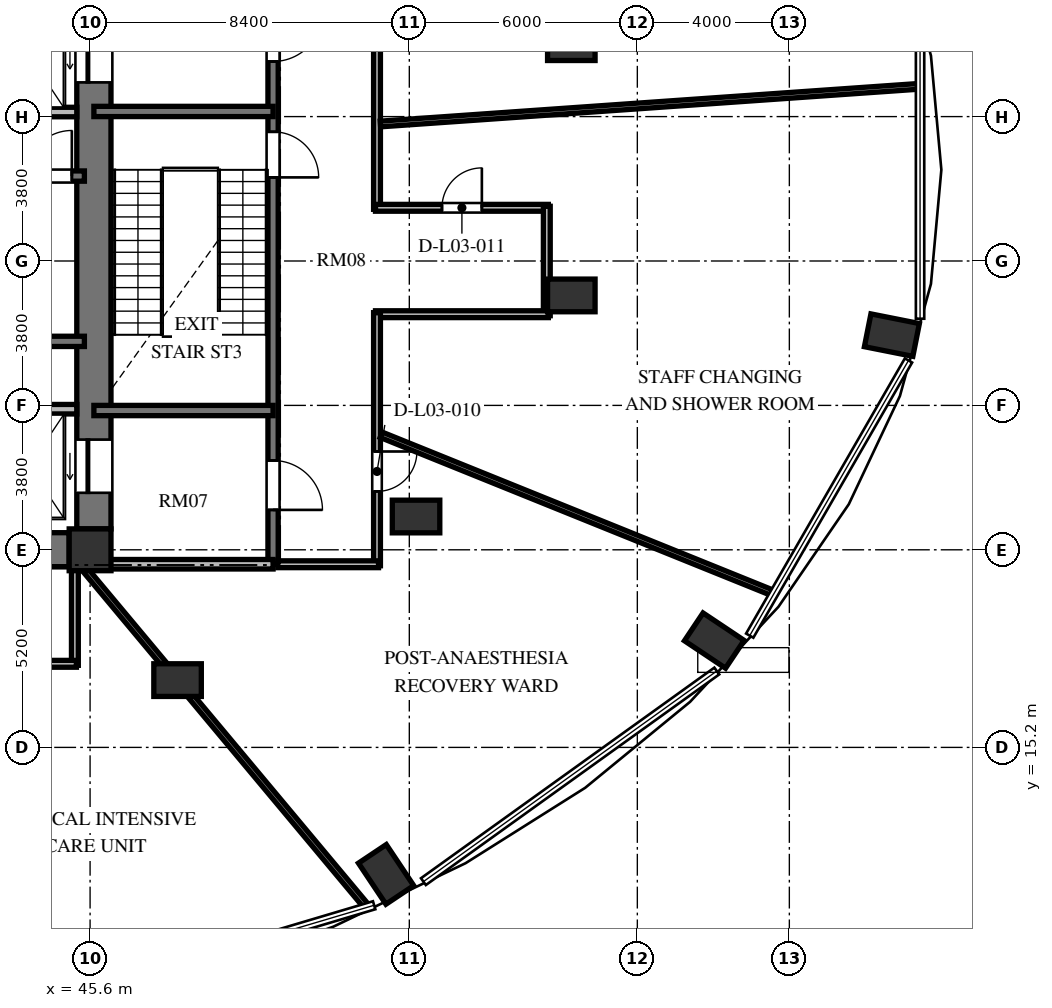
"""IFC4 building model, lengths in metres.
Left out: names, types, materials, properties, quantities, classifications, styles, units other than length and angle.
Written with IfcOpenShell. Run it as: python <this file> out.ifc"""

import sys

from ifc_helpers import new_model, si_unit, direction, frame, frame_2d, origin, origin_2d, place, context, subcontext, project, spatial, rectangle, extrude, element, fill, save


model = new_model("IFC4")
c1 = context("Model", 3, precision=1e-05, world=origin(), true_north=direction((0.0, 1.0)))
c2 = subcontext(c1, "Body", "Model", "MODEL_VIEW")
j1 = project(units=[si_unit("LENGTHUNIT", "METRE"), si_unit("PLANEANGLEUNIT", "RADIAN")], contexts=[c1])
p1 = place(None, origin())
s1 = spatial("IfcSite", under=j1, at=p1, CompositionType="ELEMENT")
p2 = place(p1, origin())
s2 = spatial("IfcBuilding", under=s1, at=p2, CompositionType="ELEMENT")
p3 = place(p2, frame((0.0, 0.0, 15.6)))
s3 = spatial("IfcBuildingStorey", under=s2, at=p3, CompositionType="ELEMENT", Elevation=15.6)
for number, where, z_axis, x_axis in (
    (1, (53.389, 11.858, 0.0), (0.0, 0.0, 1.0), (0.556, -0.831, 0.0)),
    (2, (62.025, 18.011, 0.0), (0.0, 0.0, 1.0), (0.831, -0.556, 0.0)),
    (3, (66.698, 26.05, 0.0), (0.0, 0.0, 1.0), (0.981, -0.195, 0.0)),
):
    element("IfcColumn", number, at=place(p3, frame(where, z_axis=z_axis, x_axis=x_axis)), inside=s3, PredefinedType="COLUMN", context=c2, shape_type="SweptSolid", body=[
        extrude(rectangle(XDim=1.3, YDim=0.88, at=origin_2d()), origin(), (0.0, 0.0, 1.0), 4.8),
    ])
p4 = place(p3, frame((45.6, 20.4, 0.0), z_axis=(0.0, 0.0, 1.0), x_axis=(1.0, 0.0, 0.0)))
e4 = element("IfcColumn", 4, at=p4, inside=s3, PredefinedType="COLUMN", context=c2, shape_type="SweptSolid", body=[
    extrude(rectangle(XDim=1.1, YDim=1.1, at=origin_2d()), origin(), (0.0, 0.0, 1.0), 4.8),
])
for number, where, z_axis, x_axis in (
    (5, (47.902, 16.971, 0.0), (0.0, 0.0, 1.0), (1.0, 0.0, 0.0)),
    (6, (54.177, 21.276, 0.0), (0.0, 0.0, 1.0), (1.0, 0.0, 0.0)),
    (7, (58.263, 27.094, 0.0), (0.0, 0.0, 1.0), (1.0, 0.0, 0.0)),
    (8, (58.263, 33.706, 0.0), (0.0, 0.0, 1.0), (1.0, 0.0, 0.0)),
):
    element("IfcColumn", number, at=place(p3, frame(where, z_axis=z_axis, x_axis=x_axis)), inside=s3, PredefinedType="COLUMN", context=c2, shape_type="SweptSolid", body=[
        extrude(rectangle(XDim=1.25, YDim=0.86, at=origin_2d()), origin(), (0.0, 0.0, 1.0), 4.8),
    ])
p5 = place(p3, frame((45.7, 20.95, 0.0), z_axis=(0.0, 0.0, 1.0), x_axis=(0.0, 1.0, 0.0)))
e9 = element("IfcWall", 9, at=p5, inside=s3, PredefinedType="SHEAR", context=c2, shape_type="SweptSolid", body=[
    extrude(rectangle(XDim=14.1, YDim=0.9, at=frame_2d((7.05, 0.0))), origin(), (0.0, 0.0, 1.0), 4.8),
])
p6 = place(p5, frame((11.75, 0.0, 0.0)))
e10 = element("IfcOpeningElement", 10, at=p6, cuts=e9, PredefinedType="OPENING", context=c2, shape_type="SweptSolid", body=[
    extrude(rectangle(XDim=1.4, YDim=2.3, at=frame_2d((0.7, 1.15))), frame((0.0, 0.46, 0.0), z_axis=(0.0, -1.0, 0.0), x_axis=(1.0, 0.0, 0.0)), (0.0, 0.0, 1.0), 0.92),
])
p7 = place(p5, frame((0.95, 0.0, 0.0)))
e11 = element("IfcOpeningElement", 11, at=p7, cuts=e9, PredefinedType="OPENING", context=c2, shape_type="SweptSolid", body=[
    extrude(rectangle(XDim=1.4, YDim=2.3, at=frame_2d((0.7, 1.15))), frame((0.0, 0.46, 0.0), z_axis=(0.0, -1.0, 0.0), x_axis=(1.0, 0.0, 0.0)), (0.0, 0.0, 1.0), 0.92),
])
p8 = place(p3, frame((39.75, 20.4, 0.0), z_axis=(0.0, 0.0, 1.0), x_axis=(1.0, 0.0, 0.0)))
e12 = element("IfcWall", 12, at=p8, inside=s3, PredefinedType="SHEAR", context=c2, shape_type="SweptSolid", body=[
    extrude(rectangle(XDim=5.3, YDim=0.9, at=frame_2d((2.65, 0.0))), origin(), (0.0, 0.0, 1.0), 4.8),
])
p9 = place(p3, frame((37.465, 30.235, 0.0), z_axis=(0.0, 0.0, 1.0), x_axis=(1.0, 0.0, 0.0)))
e13 = element("IfcWall", 13, at=p9, inside=s3, PredefinedType="SHEAR", context=c2, shape_type="SweptSolid", body=[
    extrude(rectangle(XDim=7.985, YDim=0.27, at=frame_2d((3.992, 0.0))), origin(), (0.0, 0.0, 1.0), 4.8),
])
p10 = place(p9, frame((6.455, 0.0, 0.0)))
e14 = element("IfcOpeningElement", 14, at=p10, cuts=e13, PredefinedType="OPENING", context=c2, shape_type="SweptSolid", body=[
    extrude(rectangle(XDim=1.2, YDim=2.15, at=frame_2d((0.6, 1.075))), frame((0.0, 0.145, 0.0), z_axis=(0.0, -1.0, 0.0), x_axis=(1.0, 0.0, 0.0)), (0.0, 0.0, 1.0), 0.29),
])
p11 = place(p3, frame((37.465, 25.885, 0.0), z_axis=(0.0, 0.0, 1.0), x_axis=(1.0, 0.0, 0.0)))
e15 = element("IfcWall", 15, at=p11, inside=s3, PredefinedType="SHEAR", context=c2, shape_type="SweptSolid", body=[
    extrude(rectangle(XDim=7.985, YDim=0.27, at=frame_2d((3.992, 0.0))), origin(), (0.0, 0.0, 1.0), 4.8),
])
for number, where, z_axis, x_axis in (
    (16, (42.95, 31.92, 0.0), (0.0, 0.0, 1.0), (1.0, 0.0, 0.0)),
    (17, (42.95, 24.1, 0.0), (0.0, 0.0, 1.0), (1.0, 0.0, 0.0)),
):
    element("IfcWall", number, at=place(p3, frame(where, z_axis=z_axis, x_axis=x_axis)), inside=s3, PredefinedType="SOLIDWALL", context=c2, shape_type="SweptSolid", body=[
        extrude(rectangle(XDim=2.3, YDim=0.25, at=frame_2d((1.15, 0.0))), origin(), (0.0, 0.0, 1.0), 4.52),
    ])
p12 = place(p3, frame((50.415, 35.845, 0.0), z_axis=(0.0, 0.0, 1.0), x_axis=(0.0, -1.0, 0.0)))
e18 = element("IfcWall", 18, at=p12, inside=s3, PredefinedType="SHEAR", context=c2, shape_type="SweptSolid", body=[
    extrude(rectangle(XDim=15.825, YDim=0.27, at=frame_2d((7.913, 0.0))), origin(), (0.0, 0.0, 1.0), 4.8),
])
p13 = place(p12, frame((4.445, 0.0, 0.0)))
e19 = element("IfcOpeningElement", 19, at=p13, cuts=e18, PredefinedType="OPENING", context=c2, shape_type="SweptSolid", body=[
    extrude(rectangle(XDim=1.2, YDim=2.15, at=frame_2d((0.6, 1.075))), frame((0.0, 0.145, 0.0), z_axis=(0.0, -1.0, 0.0), x_axis=(1.0, 0.0, 0.0)), (0.0, 0.0, 1.0), 0.29),
])
p14 = place(p12, frame((1.295, 0.0, 0.0)))
e20 = element("IfcOpeningElement", 20, at=p14, cuts=e18, PredefinedType="OPENING", context=c2, shape_type="SweptSolid", body=[
    extrude(rectangle(XDim=1.3, YDim=2.2, at=frame_2d((0.65, 1.1))), frame((0.0, 0.145, 0.0), z_axis=(0.0, -1.0, 0.0), x_axis=(1.0, 0.0, 0.0)), (0.0, 0.0, 1.0), 0.29),
])
p15 = place(p12, frame((13.095, 0.0, 0.0)))
e21 = element("IfcOpeningElement", 21, at=p15, cuts=e18, PredefinedType="OPENING", context=c2, shape_type="SweptSolid", body=[
    extrude(rectangle(XDim=1.3, YDim=2.2, at=frame_2d((0.65, 1.1))), frame((0.0, 0.145, 0.0), z_axis=(0.0, -1.0, 0.0), x_axis=(1.0, 0.0, 0.0)), (0.0, 0.0, 1.0), 0.29),
])
for number, where, z_axis, x_axis in (
    (22, (45.7, 31.935, 0.0), (0.0, 0.0, 1.0), (1.0, 0.0, 0.0)),
    (23, (45.7, 24.065, 0.0), (0.0, 0.0, 1.0), (1.0, 0.0, 0.0)),
):
    element("IfcWall", number, at=place(p3, frame(where, z_axis=z_axis, x_axis=x_axis)), inside=s3, PredefinedType="SHEAR", context=c2, shape_type="SweptSolid", body=[
        extrude(rectangle(XDim=4.715, YDim=0.27, at=frame_2d((2.357, 0.0))), origin(), (0.0, 0.0, 1.0), 4.8),
    ])
p16 = place(p3, frame((45.7, 20.02, 0.0), z_axis=(0.0, 0.0, 1.0), x_axis=(1.0, 0.0, 0.0)))
e24 = element("IfcWall", 24, at=p16, inside=s3, PredefinedType="SOLIDWALL", context=c2, shape_type="SweptSolid", body=[
    extrude(rectangle(XDim=4.715, YDim=0.25, at=frame_2d((2.357, 0.0))), origin(), (0.0, 0.0, 1.0), 4.52),
])
p17 = place(p3, frame((53.15, 38.79, 0.0), z_axis=(0.0, 0.0, 1.0), x_axis=(0.0, -1.0, 0.0)))
e25 = element("IfcWall", 25, at=p17, inside=s3, PredefinedType="PARTITIONING", context=c2, shape_type="SweptSolid", body=[
    extrude(rectangle(XDim=9.43, YDim=0.18, at=frame_2d((4.715, 0.0))), origin(), (0.0, 0.0, 1.0), 4.205),
])
p18 = place(p17, frame((3.226, 0.0, 0.0)))
e26 = element("IfcOpeningElement", 26, at=p18, cuts=e25, PredefinedType="OPENING", context=c2, shape_type="SweptSolid", body=[
    extrude(rectangle(XDim=1.05, YDim=2.15, at=frame_2d((0.525, 1.075))), frame((0.0, 0.1, 0.0), z_axis=(0.0, -1.0, 0.0), x_axis=(1.0, 0.0, 0.0)), (0.0, 0.0, 1.0), 0.2),
])
p19 = place(p3, frame((53.11, 29.4, 0.0), z_axis=(0.0, 0.0, 1.0), x_axis=(1.0, 0.0, 0.0)))
e27 = element("IfcWall", 27, at=p19, inside=s3, PredefinedType="PARTITIONING", context=c2, shape_type="SweptSolid", body=[
    extrude(rectangle(XDim=4.548, YDim=0.18, at=frame_2d((2.274, 0.0))), origin(), (0.0, 0.0, 1.0), 4.52),
])
p20 = place(p19, frame((1.749, 0.0, 0.0)))
e28 = element("IfcOpeningElement", 28, at=p20, cuts=e27, PredefinedType="OPENING", context=c2, shape_type="SweptSolid", body=[
    extrude(rectangle(XDim=1.05, YDim=2.15, at=frame_2d((0.525, 1.075))), frame((0.0, 0.1, 0.0), z_axis=(0.0, -1.0, 0.0), x_axis=(1.0, 0.0, 0.0)), (0.0, 0.0, 1.0), 0.2),
])
p21 = place(p3, frame((57.618, 29.44, 0.0), z_axis=(0.0, 0.0, 1.0), x_axis=(0.0, -1.0, 0.0)))
e29 = element("IfcWall", 29, at=p21, inside=s3, PredefinedType="PARTITIONING", context=c2, shape_type="SweptSolid", body=[
    extrude(rectangle(XDim=2.88, YDim=0.18, at=frame_2d((1.44, 0.0))), origin(), (0.0, 0.0, 1.0), 4.52),
])
p22 = place(p3, frame((57.658, 26.6, 0.0), z_axis=(0.0, 0.0, 1.0), x_axis=(-1.0, 0.0, 0.0)))
e30 = element("IfcWall", 30, at=p22, inside=s3, PredefinedType="PARTITIONING", context=c2, shape_type="SweptSolid", body=[
    extrude(rectangle(XDim=4.548, YDim=0.18, at=frame_2d((2.274, 0.0))), origin(), (0.0, 0.0, 1.0), 4.52),
])
p23 = place(p3, frame((53.15, 26.64, 0.0), z_axis=(0.0, 0.0, 1.0), x_axis=(0.0, -1.0, 0.0)))
e31 = element("IfcWall", 31, at=p23, inside=s3, PredefinedType="PARTITIONING", context=c2, shape_type="SweptSolid", body=[
    extrude(rectangle(XDim=6.66, YDim=0.18, at=frame_2d((3.33, 0.0))), origin(), (0.0, 0.0, 1.0), 4.52),
])
p24 = place(p23, frame((3.653, 0.0, 0.0)))
e32 = element("IfcOpeningElement", 32, at=p24, cuts=e31, PredefinedType="OPENING", context=c2, shape_type="SweptSolid", body=[
    extrude(rectangle(XDim=1.05, YDim=2.15, at=frame_2d((0.525, 1.075))), frame((0.0, 0.1, 0.0), z_axis=(0.0, -1.0, 0.0), x_axis=(1.0, 0.0, 0.0)), (0.0, 0.0, 1.0), 0.2),
])
p25 = place(p3, frame((53.19, 20.02, 0.0), z_axis=(0.0, 0.0, 1.0), x_axis=(-1.0, 0.0, 0.0)))
e33 = element("IfcWall", 33, at=p25, inside=s3, PredefinedType="PARTITIONING", context=c2, shape_type="SweptSolid", body=[
    extrude(rectangle(XDim=2.65, YDim=0.18, at=frame_2d((1.325, 0.0))), origin(), (0.0, 0.0, 1.0), 4.52),
])
p26 = place(p3, frame((45.2, 19.91, 0.0), z_axis=(0.0, 0.0, 1.0), x_axis=(0.0, -1.0, 0.0)))
e34 = element("IfcWall", 34, at=p26, inside=s3, PredefinedType="PARTITIONING", context=c2, shape_type="SweptSolid", body=[
    extrude(rectangle(XDim=2.55, YDim=0.18, at=frame_2d((1.275, 0.0))), origin(), (0.0, 0.0, 1.0), 4.52),
])
p27 = place(p3, frame((45.24, 17.4, 0.0), z_axis=(0.0, 0.0, 1.0), x_axis=(-1.0, 0.0, 0.0)))
e35 = element("IfcWall", 35, at=p27, inside=s3, PredefinedType="PARTITIONING", context=c2, shape_type="SweptSolid", body=[
    extrude(rectangle(XDim=21.93, YDim=0.18, at=frame_2d((10.965, 0.0))), origin(), (0.0, 0.0, 1.0), 4.52),
])
p28 = place(p27, frame((17.127, 0.0, 0.0)))
e36 = element("IfcOpeningElement", 36, at=p28, cuts=e35, PredefinedType="OPENING", context=c2, shape_type="SweptSolid", body=[
    extrude(rectangle(XDim=1.4, YDim=2.2, at=frame_2d((0.7, 1.1))), frame((0.0, 0.1, 0.0), z_axis=(0.0, -1.0, 0.0), x_axis=(1.0, 0.0, 0.0)), (0.0, 0.0, 1.0), 0.2),
])
p29 = place(p27, frame((9.071, 0.0, 0.0)))
e37 = element("IfcOpeningElement", 37, at=p29, cuts=e35, PredefinedType="OPENING", context=c2, shape_type="SweptSolid", body=[
    extrude(rectangle(XDim=0.95, YDim=2.1, at=frame_2d((0.475, 1.05))), frame((0.0, 0.1, 0.0), z_axis=(0.0, -1.0, 0.0), x_axis=(1.0, 0.0, 0.0)), (0.0, 0.0, 1.0), 0.2),
])
p30 = place(p27, frame((2.177, 0.0, 0.0)))
e38 = element("IfcOpeningElement", 38, at=p30, cuts=e35, PredefinedType="OPENING", context=c2, shape_type="SweptSolid", body=[
    extrude(rectangle(XDim=1.4, YDim=2.2, at=frame_2d((0.7, 1.1))), frame((0.0, 0.1, 0.0), z_axis=(0.0, -1.0, 0.0), x_axis=(1.0, 0.0, 0.0)), (0.0, 0.0, 1.0), 0.2),
])
p31 = place(p3, frame((45.407, 19.95, 0.0), z_axis=(0.0, 0.0, 1.0), x_axis=(0.641117276754, -0.767442921296, 0.0)))
e39 = element("IfcWall", 39, at=p31, inside=s3, PredefinedType="PARTITIONING", context=c2, shape_type="SweptSolid", body=[
    extrude(rectangle(XDim=11.681, YDim=0.15, at=frame_2d((5.84, 0.0))), origin(), (0.0, 0.0, 1.0), 3.805),
])
p32 = place(p3, frame((53.26, 23.426, 0.0), z_axis=(0.0, 0.0, 1.0), x_axis=(0.927183900085, -0.374606480754, 0.0)))
e40 = element("IfcWall", 40, at=p32, inside=s3, PredefinedType="PARTITIONING", context=c2, shape_type="SweptSolid", body=[
    extrude(rectangle(XDim=11.145, YDim=0.15, at=frame_2d((5.572, 0.0))), origin(), (0.0, 0.0, 1.0), 4.52),
])
p33 = place(p3, frame((53.24, 31.605, 0.0), z_axis=(0.0, 0.0, 1.0), x_axis=(0.997563398333, 0.069765796107, 0.0)))
e41 = element("IfcWall", 41, at=p33, inside=s3, PredefinedType="PARTITIONING", context=c2, shape_type="SweptSolid", body=[
    extrude(rectangle(XDim=14.232, YDim=0.15, at=frame_2d((7.116, 0.0))), origin(), (0.0, 0.0, 1.0), 4.52),
])
p34 = place(p10, origin())
e42 = element("IfcDoor", 42, at=p34, inside=s3, OperationType="SINGLE_SWING_RIGHT", PredefinedType="DOOR", context=c2, shape_type="SweptSolid", body=[
    extrude(rectangle(XDim=1.2, YDim=2.15, at=frame_2d((0.6, 1.075))), frame((0.0, 0.025, 0.0), z_axis=(0.0, -1.0, 0.0), x_axis=(1.0, 0.0, 0.0)), (0.0, 0.0, 1.0), 0.05),
])
fill(e14, e42)
p35 = place(p6, origin())
e43 = element("IfcDoor", 43, at=p35, inside=s3, OperationType="SLIDING_TO_LEFT", PredefinedType="DOOR", context=c2, shape_type="SweptSolid", body=[
    extrude(rectangle(XDim=1.4, YDim=2.3, at=frame_2d((0.7, 1.15))), frame((0.0, 0.025, 0.0), z_axis=(0.0, -1.0, 0.0), x_axis=(1.0, 0.0, 0.0)), (0.0, 0.0, 1.0), 0.05),
])
fill(e10, e43)
p36 = place(p7, origin())
e44 = element("IfcDoor", 44, at=p36, inside=s3, OperationType="SLIDING_TO_LEFT", PredefinedType="DOOR", context=c2, shape_type="SweptSolid", body=[
    extrude(rectangle(XDim=1.4, YDim=2.3, at=frame_2d((0.7, 1.15))), frame((0.0, 0.025, 0.0), z_axis=(0.0, -1.0, 0.0), x_axis=(1.0, 0.0, 0.0)), (0.0, 0.0, 1.0), 0.05),
])
fill(e11, e44)
p37 = place(p13, origin())
e45 = element("IfcDoor", 45, at=p37, inside=s3, OperationType="SINGLE_SWING_RIGHT", PredefinedType="DOOR", context=c2, shape_type="SweptSolid", body=[
    extrude(rectangle(XDim=1.2, YDim=2.15, at=frame_2d((0.6, 1.075))), frame((0.0, 0.025, 0.0), z_axis=(0.0, -1.0, 0.0), x_axis=(1.0, 0.0, 0.0)), (0.0, 0.0, 1.0), 0.05),
])
fill(e19, e45)
p38 = place(p14, origin())
e46 = element("IfcDoor", 46, at=p38, inside=s3, OperationType="SINGLE_SWING_LEFT", PredefinedType="DOOR", context=c2, shape_type="SweptSolid", body=[
    extrude(rectangle(XDim=1.3, YDim=2.2, at=frame_2d((0.65, 1.1))), frame((0.0, 0.025, 0.0), z_axis=(0.0, -1.0, 0.0), x_axis=(1.0, 0.0, 0.0)), (0.0, 0.0, 1.0), 0.05),
])
fill(e20, e46)
p39 = place(p15, origin())
e47 = element("IfcDoor", 47, at=p39, inside=s3, OperationType="SINGLE_SWING_RIGHT", PredefinedType="DOOR", context=c2, shape_type="SweptSolid", body=[
    extrude(rectangle(XDim=1.3, YDim=2.2, at=frame_2d((0.65, 1.1))), frame((0.0, 0.025, 0.0), z_axis=(0.0, -1.0, 0.0), x_axis=(1.0, 0.0, 0.0)), (0.0, 0.0, 1.0), 0.05),
])
fill(e21, e47)
p40 = place(p24, origin())
e48 = element("IfcDoor", 48, at=p40, inside=s3, OperationType="SINGLE_SWING_LEFT", PredefinedType="DOOR", context=c2, shape_type="SweptSolid", body=[
    extrude(rectangle(XDim=1.05, YDim=2.15, at=frame_2d((0.525, 1.075))), frame((0.0, 0.025, 0.0), z_axis=(0.0, -1.0, 0.0), x_axis=(1.0, 0.0, 0.0)), (0.0, 0.0, 1.0), 0.05),
])
fill(e32, e48)
p41 = place(p20, origin())
e49 = element("IfcDoor", 49, at=p41, inside=s3, OperationType="SINGLE_SWING_RIGHT", PredefinedType="DOOR", context=c2, shape_type="SweptSolid", body=[
    extrude(rectangle(XDim=1.05, YDim=2.15, at=frame_2d((0.525, 1.075))), frame((0.0, 0.025, 0.0), z_axis=(0.0, -1.0, 0.0), x_axis=(1.0, 0.0, 0.0)), (0.0, 0.0, 1.0), 0.05),
])
fill(e28, e49)
save(model, sys.argv[1])
